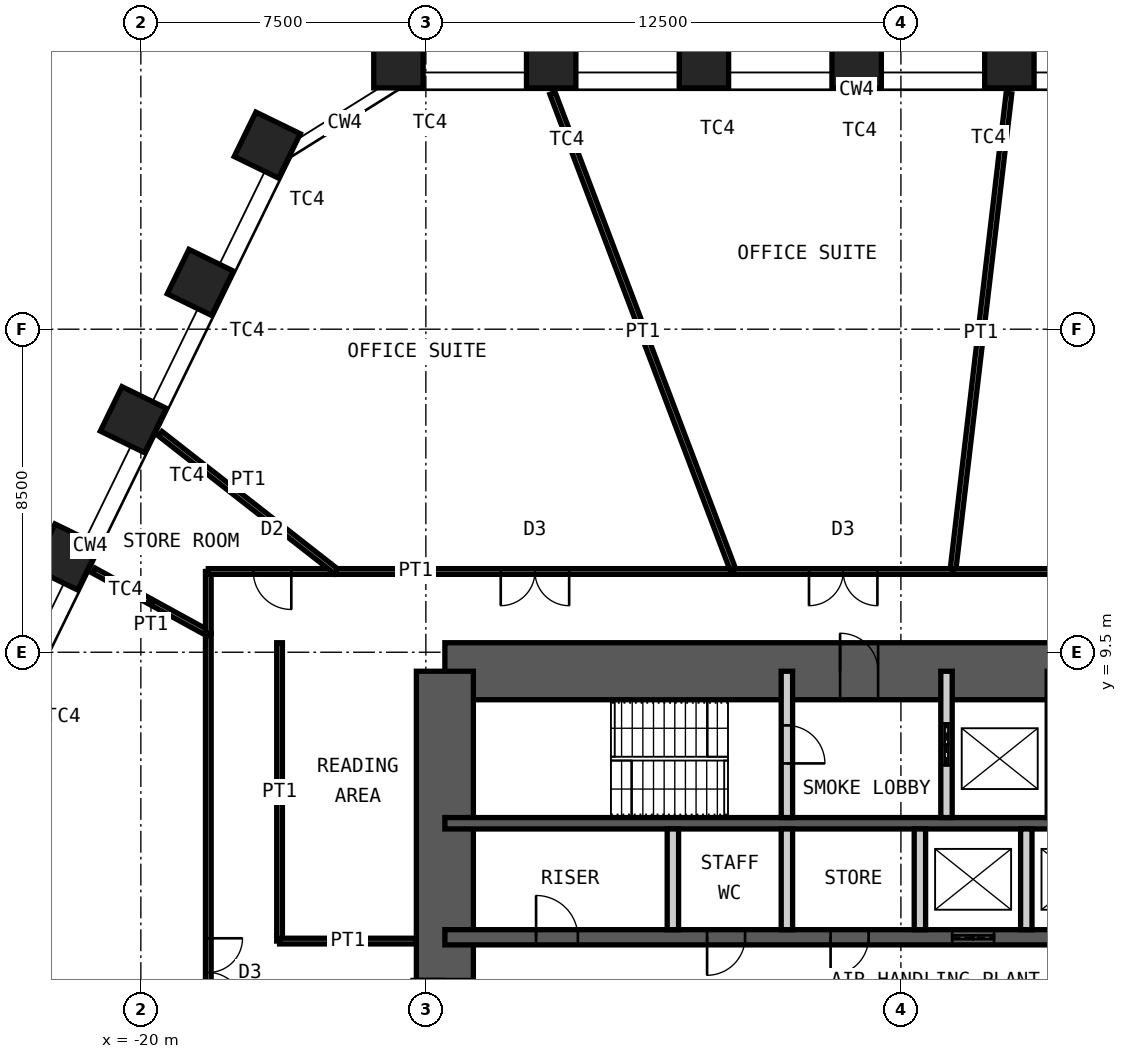
"""IFC4 building model, lengths in metres.
Left out: names, types, materials, properties, quantities, classifications, styles, units other than length and angle.
Written with IfcOpenShell. Run it as: python <this file> out.ifc"""

import sys

from ifc_helpers import new_model, si_unit, direction, frame, frame_2d, origin, origin_2d, place, context, subcontext, project, spatial, rectangle, hollow_rectangle, extrude, element, fill, save


model = new_model("IFC4")
c1 = context("Model", 3, precision=1e-05, world=origin(), true_north=direction((0.0, 1.0)))
c2 = subcontext(c1, "Body", "Model", "MODEL_VIEW")
j1 = project(units=[si_unit("LENGTHUNIT", "METRE"), si_unit("PLANEANGLEUNIT", "RADIAN")], contexts=[c1])
p1 = place(None, origin())
s1 = spatial("IfcSite", under=j1, at=p1, CompositionType="ELEMENT")
p2 = place(p1, origin())
s2 = spatial("IfcBuilding", under=s1, at=p2, CompositionType="ELEMENT")
p3 = place(p2, frame((0.0, 0.0, 161.8)))
s3 = spatial("IfcBuildingStorey", under=s2, at=p3, CompositionType="ELEMENT", Elevation=161.8)
for number, where, z_axis, x_axis in (
    (1, (-13.222, 25.0, 0.0), (0.0, 0.0, 1.0), (-1.0, 0.0, 0.0)),
    (2, (-9.203, 25.0, 0.0), (0.0, 0.0, 1.0), (-1.0, 0.0, 0.0)),
    (3, (-5.184, 25.0, 0.0), (0.0, 0.0, 1.0), (-1.0, 0.0, 0.0)),
    (4, (-1.165, 25.0, 0.0), (0.0, 0.0, 1.0), (-1.0, 0.0, 0.0)),
    (5, (2.854, 25.0, 0.0), (0.0, 0.0, 1.0), (-1.0, 0.0, 0.0)),
    (6, (-21.959, 12.006, 0.0), (0.0, 0.0, 1.0), (-0.438, -0.899, 0.0)),
    (7, (-20.198, 15.618, 0.0), (0.0, 0.0, 1.0), (-0.438, -0.899, 0.0)),
    (8, (-18.436, 19.23, 0.0), (0.0, 0.0, 1.0), (-0.438, -0.899, 0.0)),
    (9, (-16.674, 22.843, 0.0), (0.0, 0.0, 1.0), (-0.438, -0.899, 0.0)),
):
    element("IfcColumn", number, at=place(p3, frame(where, z_axis=z_axis, x_axis=x_axis)), inside=s3, PredefinedType="COLUMN", context=c2, shape_type="SweptSolid", body=[
        extrude(hollow_rectangle(XDim=1.3, YDim=1.3, WallThickness=0.1, at=origin_2d()), origin(), (0.0, 0.0, 1.0), 4.2),
    ])
p4 = place(p3, frame((-12.0, 9.0, 0.0), z_axis=(0.0, 0.0, 1.0), x_axis=(1.0, 0.0, 0.0)))
e10 = element("IfcWall", 10, at=p4, inside=s3, PredefinedType="SHEAR", context=c2, shape_type="SweptSolid", body=[
    extrude(rectangle(XDim=24.0, YDim=1.5, at=frame_2d((12.0, 0.0))), origin(), (0.0, 0.0, 1.0), 4.2),
])
p5 = place(p4, frame((10.4, 0.0, 0.0)))
e11 = element("IfcOpeningElement", 11, at=p5, cuts=e10, PredefinedType="OPENING", context=c2, shape_type="SweptSolid", body=[
    extrude(rectangle(XDim=1.0, YDim=2.1, at=frame_2d((0.5, 1.05))), frame((0.0, 0.76, 0.0), z_axis=(0.0, -1.0, 0.0), x_axis=(1.0, 0.0, 0.0)), (0.0, 0.0, 1.0), 1.52),
])
p6 = place(p4, frame((17.6, 0.0, 0.0)))
e12 = element("IfcOpeningElement", 12, at=p6, cuts=e10, PredefinedType="OPENING", context=c2, shape_type="SweptSolid", body=[
    extrude(rectangle(XDim=0.9, YDim=2.1, at=frame_2d((0.45, 1.05))), frame((0.0, 0.76, 0.0), z_axis=(0.0, -1.0, 0.0), x_axis=(1.0, 0.0, 0.0)), (0.0, 0.0, 1.0), 1.52),
])
p7 = place(p4, frame((21.9, 0.0, 0.0)))
e13 = element("IfcOpeningElement", 13, at=p7, cuts=e10, PredefinedType="OPENING", context=c2, shape_type="SweptSolid", body=[
    extrude(rectangle(XDim=0.9, YDim=2.1, at=frame_2d((0.45, 1.05))), frame((0.0, 0.76, 0.0), z_axis=(0.0, -1.0, 0.0), x_axis=(1.0, 0.0, 0.0)), (0.0, 0.0, 1.0), 1.52),
])
p8 = place(p3, frame((-12.0, -9.0, 0.0), z_axis=(0.0, 0.0, 1.0), x_axis=(0.0, 1.0, 0.0)))
e14 = element("IfcWall", 14, at=p8, inside=s3, PredefinedType="SHEAR", context=c2, shape_type="SweptSolid", body=[
    extrude(rectangle(XDim=18.0, YDim=1.5, at=frame_2d((9.0, 0.0))), origin(), (0.0, 0.0, 1.0), 4.2),
])
p9 = place(p8, frame((8.1, 0.0, 0.0)))
e15 = element("IfcOpeningElement", 15, at=p9, cuts=e14, PredefinedType="OPENING", context=c2, shape_type="SweptSolid", body=[
    extrude(rectangle(XDim=1.8, YDim=2.1, at=frame_2d((0.9, 1.05))), frame((0.0, 0.76, 0.0), z_axis=(0.0, -1.0, 0.0), x_axis=(1.0, 0.0, 0.0)), (0.0, 0.0, 1.0), 1.52),
])
p10 = place(p3, frame((-12.0, 5.0, 0.0), z_axis=(0.0, 0.0, 1.0), x_axis=(1.0, 0.0, 0.0)))
e16 = element("IfcWall", 16, at=p10, inside=s3, PredefinedType="SHEAR", context=c2, shape_type="SweptSolid", body=[
    extrude(rectangle(XDim=24.0, YDim=0.3, at=frame_2d((12.0, 0.0))), origin(), (0.0, 0.0, 1.0), 4.2),
])
p11 = place(p3, frame((-12.0, 2.0, 0.0), z_axis=(0.0, 0.0, 1.0), x_axis=(1.0, 0.0, 0.0)))
e17 = element("IfcWall", 17, at=p11, inside=s3, PredefinedType="SHEAR", context=c2, shape_type="SweptSolid", body=[
    extrude(rectangle(XDim=24.0, YDim=0.4, at=frame_2d((12.0, 0.0))), origin(), (0.0, 0.0, 1.0), 4.2),
])
p12 = place(p11, frame((2.4, 0.0, 0.0)))
e18 = element("IfcOpeningElement", 18, at=p12, cuts=e17, PredefinedType="OPENING", context=c2, shape_type="SweptSolid", body=[
    extrude(rectangle(XDim=1.1, YDim=2.1, at=frame_2d((0.55, 1.05))), frame((0.0, 0.21, 0.0), z_axis=(0.0, -1.0, 0.0), x_axis=(1.0, 0.0, 0.0)), (0.0, 0.0, 1.0), 0.42),
])
p13 = place(p11, frame((22.0, 0.0, 0.0)))
e19 = element("IfcOpeningElement", 19, at=p13, cuts=e17, PredefinedType="OPENING", context=c2, shape_type="SweptSolid", body=[
    extrude(rectangle(XDim=1.1, YDim=2.1, at=frame_2d((0.55, 1.05))), frame((0.0, 0.21, 0.0), z_axis=(0.0, -1.0, 0.0), x_axis=(1.0, 0.0, 0.0)), (0.0, 0.0, 1.0), 0.42),
])
p14 = place(p11, frame((10.15, 0.0, 0.0)))
e20 = element("IfcOpeningElement", 20, at=p14, cuts=e17, PredefinedType="OPENING", context=c2, shape_type="SweptSolid", body=[
    extrude(rectangle(XDim=1.0, YDim=2.1, at=frame_2d((0.5, 1.05))), frame((0.0, 0.21, 0.0), z_axis=(0.0, -1.0, 0.0), x_axis=(1.0, 0.0, 0.0)), (0.0, 0.0, 1.0), 0.42),
])
p15 = place(p11, frame((6.9, 0.0, 0.0)))
e21 = element("IfcOpeningElement", 21, at=p15, cuts=e17, PredefinedType="OPENING", context=c2, shape_type="SweptSolid", body=[
    extrude(rectangle(XDim=1.0, YDim=2.1, at=frame_2d((0.5, 1.05))), frame((0.0, 0.21, 0.0), z_axis=(0.0, -1.0, 0.0), x_axis=(1.0, 0.0, 0.0)), (0.0, 0.0, 1.0), 0.42),
])
p16 = place(p11, frame((13.35, 0.0, 0.0)))
e22 = element("IfcOpeningElement", 22, at=p16, cuts=e17, PredefinedType="OPENING", context=c2, shape_type="SweptSolid", body=[
    extrude(rectangle(XDim=1.1, YDim=2.4, at=frame_2d((0.55, 1.2))), frame((0.0, 0.21, 0.0), z_axis=(0.0, -1.0, 0.0), x_axis=(1.0, 0.0, 0.0)), (0.0, 0.0, 1.0), 0.42),
])
p17 = place(p11, frame((16.15, 0.0, 0.0)))
e23 = element("IfcOpeningElement", 23, at=p17, cuts=e17, PredefinedType="OPENING", context=c2, shape_type="SweptSolid", body=[
    extrude(rectangle(XDim=1.1, YDim=2.4, at=frame_2d((0.55, 1.2))), frame((0.0, 0.21, 0.0), z_axis=(0.0, -1.0, 0.0), x_axis=(1.0, 0.0, 0.0)), (0.0, 0.0, 1.0), 0.42),
])
p18 = place(p11, frame((18.95, 0.0, 0.0)))
e24 = element("IfcOpeningElement", 24, at=p18, cuts=e17, PredefinedType="OPENING", context=c2, shape_type="SweptSolid", body=[
    extrude(rectangle(XDim=1.1, YDim=2.4, at=frame_2d((0.55, 1.2))), frame((0.0, 0.21, 0.0), z_axis=(0.0, -1.0, 0.0), x_axis=(1.0, 0.0, 0.0)), (0.0, 0.0, 1.0), 0.42),
])
p19 = place(p3, frame((-3.0, 5.15, 0.0), z_axis=(0.0, 0.0, 1.0), x_axis=(0.0, 1.0, 0.0)))
e25 = element("IfcWall", 25, at=p19, inside=s3, PredefinedType="PARTITIONING", context=c2, shape_type="SweptSolid", body=[
    extrude(rectangle(XDim=3.85, YDim=0.3, at=frame_2d((1.925, 0.0))), origin(), (0.0, 0.0, 1.0), 3.98),
])
p20 = place(p19, frame((1.425, 0.0, 0.0)))
e26 = element("IfcOpeningElement", 26, at=p20, cuts=e25, PredefinedType="OPENING", context=c2, shape_type="SweptSolid", body=[
    extrude(rectangle(XDim=1.0, YDim=2.1, at=frame_2d((0.5, 1.05))), frame((0.0, 0.16, 0.0), z_axis=(0.0, -1.0, 0.0), x_axis=(1.0, 0.0, 0.0)), (0.0, 0.0, 1.0), 0.32),
])
p21 = place(p3, frame((1.2, 5.15, 0.0), z_axis=(0.0, 0.0, 1.0), x_axis=(0.0, 1.0, 0.0)))
e27 = element("IfcWall", 27, at=p21, inside=s3, PredefinedType="PARTITIONING", context=c2, shape_type="SweptSolid", body=[
    extrude(rectangle(XDim=3.85, YDim=0.3, at=frame_2d((1.925, 0.0))), origin(), (0.0, 0.0, 1.0), 3.98),
])
p22 = place(p21, frame((1.375, 0.0, 0.0)))
e28 = element("IfcOpeningElement", 28, at=p22, cuts=e27, PredefinedType="OPENING", context=c2, shape_type="SweptSolid", body=[
    extrude(rectangle(XDim=1.1, YDim=2.4, at=frame_2d((0.55, 1.2))), frame((0.0, 0.16, 0.0), z_axis=(0.0, -1.0, 0.0), x_axis=(1.0, 0.0, 0.0)), (0.0, 0.0, 1.0), 0.32),
])
p23 = place(p3, frame((4.0, 5.15, 0.0), z_axis=(0.0, 0.0, 1.0), x_axis=(0.0, 1.0, 0.0)))
e29 = element("IfcWall", 29, at=p23, inside=s3, PredefinedType="PARTITIONING", context=c2, shape_type="SweptSolid", body=[
    extrude(rectangle(XDim=3.85, YDim=0.3, at=frame_2d((1.925, 0.0))), origin(), (0.0, 0.0, 1.0), 3.98),
])
for number, where, z_axis, x_axis in (
    (30, (-6.0, 2.2, 0.0), (0.0, 0.0, 1.0), (0.0, 1.0, 0.0)),
    (31, (-3.0, 2.2, 0.0), (0.0, 0.0, 1.0), (0.0, 1.0, 0.0)),
    (32, (0.5, 2.2, 0.0), (0.0, 0.0, 1.0), (0.0, 1.0, 0.0)),
    (33, (3.3, 2.2, 0.0), (0.0, 0.0, 1.0), (0.0, 1.0, 0.0)),
):
    element("IfcWall", number, at=place(p3, frame(where, z_axis=z_axis, x_axis=x_axis)), inside=s3, PredefinedType="PARTITIONING", context=c2, shape_type="SweptSolid", body=[
        extrude(rectangle(XDim=2.65, YDim=0.3, at=frame_2d((1.325, 0.0))), origin(), (0.0, 0.0, 1.0), 3.98),
    ])
p24 = place(p3, frame((2.843, 24.201, 0.0), z_axis=(0.0, 0.0, 1.0), x_axis=(-0.116670084723, -0.993170726175, 0.0)))
e34 = element("IfcWall", 34, at=p24, inside=s3, PredefinedType="PARTITIONING", context=c2, shape_type="SweptSolid", body=[
    extrude(rectangle(XDim=12.662, YDim=0.15, at=frame_2d((6.331, 0.0))), origin(), (0.0, 0.0, 1.0), 3.28),
])
p25 = place(p3, frame((1.366, 11.625, 0.0), z_axis=(0.0, 0.0, 1.0), x_axis=(1.0, 0.0, 0.0)))
e35 = element("IfcWall", 35, at=p25, inside=s3, PredefinedType="PARTITIONING", context=c2, shape_type="SweptSolid", body=[
    extrude(rectangle(XDim=8.46, YDim=0.15, at=frame_2d((4.23, 0.0))), origin(), (0.0, 0.0, 1.0), 4.03),
])
p26 = place(p25, frame((3.33, 0.0, 0.0)))
e36 = element("IfcOpeningElement", 36, at=p26, cuts=e35, PredefinedType="OPENING", context=c2, shape_type="SweptSolid", body=[
    extrude(rectangle(XDim=1.8, YDim=2.4, at=frame_2d((0.9, 1.2))), frame((0.0, 0.085, 0.0), z_axis=(0.0, -1.0, 0.0), x_axis=(1.0, 0.0, 0.0)), (0.0, 0.0, 1.0), 0.17),
])
p27 = place(p3, frame((-18.225, -7.849, 0.0), z_axis=(0.0, 0.0, 1.0), x_axis=(0.0, 1.0, 0.0)))
e37 = element("IfcWall", 37, at=p27, inside=s3, PredefinedType="PARTITIONING", context=c2, shape_type="SweptSolid", body=[
    extrude(rectangle(XDim=17.845, YDim=0.15, at=frame_2d((8.922, 0.0))), origin(), (0.0, 0.0, 1.0), 4.03),
])
p28 = place(p27, frame((8.022, 0.0, 0.0)))
e38 = element("IfcOpeningElement", 38, at=p28, cuts=e37, PredefinedType="OPENING", context=c2, shape_type="SweptSolid", body=[
    extrude(rectangle(XDim=1.8, YDim=2.4, at=frame_2d((0.9, 1.2))), frame((0.0, 0.085, 0.0), z_axis=(0.0, -1.0, 0.0), x_axis=(1.0, 0.0, 0.0)), (0.0, 0.0, 1.0), 0.17),
])
p29 = place(p3, frame((-21.242, 11.651, 0.0), z_axis=(0.0, 0.0, 1.0), x_axis=(0.876768023831, -0.480913539409, 0.0)))
e39 = element("IfcWall", 39, at=p29, inside=s3, PredefinedType="PARTITIONING", context=c2, shape_type="SweptSolid", body=[
    extrude(rectangle(XDim=3.441, YDim=0.15, at=frame_2d((1.721, 0.0))), origin(), (0.0, 0.0, 1.0), 3.28),
])
p30 = place(p3, frame((-18.225, 9.996, 0.0), z_axis=(0.0, 0.0, 1.0), x_axis=(0.0, 1.0, 0.0)))
e40 = element("IfcWall", 40, at=p30, inside=s3, PredefinedType="PARTITIONING", context=c2, shape_type="SweptSolid", body=[
    extrude(rectangle(XDim=1.629, YDim=0.15, at=frame_2d((0.814, 0.0))), origin(), (0.0, 0.0, 1.0), 4.03),
])
p31 = place(p3, frame((-18.225, 11.625, 0.0), z_axis=(0.0, 0.0, 1.0), x_axis=(1.0, 0.0, 0.0)))
e41 = element("IfcWall", 41, at=p31, inside=s3, PredefinedType="PARTITIONING", context=c2, shape_type="SweptSolid", body=[
    extrude(rectangle(XDim=3.368, YDim=0.15, at=frame_2d((1.684, 0.0))), origin(), (0.0, 0.0, 1.0), 4.03),
])
p32 = place(p31, frame((1.184, 0.0, 0.0)))
e42 = element("IfcOpeningElement", 42, at=p32, cuts=e41, PredefinedType="OPENING", context=c2, shape_type="SweptSolid", body=[
    extrude(rectangle(XDim=1.0, YDim=2.4, at=frame_2d((0.5, 1.2))), frame((0.0, 0.085, 0.0), z_axis=(0.0, -1.0, 0.0), x_axis=(1.0, 0.0, 0.0)), (0.0, 0.0, 1.0), 0.17),
])
p33 = place(p3, frame((-19.49, 15.25, 0.0), z_axis=(0.0, 0.0, 1.0), x_axis=(0.787549668605, -0.616251182133, 0.0)))
e43 = element("IfcWall", 43, at=p33, inside=s3, PredefinedType="PARTITIONING", context=c2, shape_type="SweptSolid", body=[
    extrude(rectangle(XDim=5.882, YDim=0.15, at=frame_2d((2.941, 0.0))), origin(), (0.0, 0.0, 1.0), 3.28),
])
p34 = place(p3, frame((-14.857, 11.625, 0.0), z_axis=(0.0, 0.0, 1.0), x_axis=(1.0, 0.0, 0.0)))
e44 = element("IfcWall", 44, at=p34, inside=s3, PredefinedType="PARTITIONING", context=c2, shape_type="SweptSolid", body=[
    extrude(rectangle(XDim=10.455, YDim=0.15, at=frame_2d((5.227, 0.0))), origin(), (0.0, 0.0, 1.0), 4.03),
])
p35 = place(p34, frame((4.327, 0.0, 0.0)))
e45 = element("IfcOpeningElement", 45, at=p35, cuts=e44, PredefinedType="OPENING", context=c2, shape_type="SweptSolid", body=[
    extrude(rectangle(XDim=1.8, YDim=2.4, at=frame_2d((0.9, 1.2))), frame((0.0, 0.085, 0.0), z_axis=(0.0, -1.0, 0.0), x_axis=(1.0, 0.0, 0.0)), (0.0, 0.0, 1.0), 0.17),
])
p36 = place(p3, frame((-9.167, 24.207, 0.0), z_axis=(0.0, 0.0, 1.0), x_axis=(0.354156368181, -0.935186220427, 0.0)))
e46 = element("IfcWall", 46, at=p36, inside=s3, PredefinedType="PARTITIONING", context=c2, shape_type="SweptSolid", body=[
    extrude(rectangle(XDim=13.454, YDim=0.15, at=frame_2d((6.727, 0.0))), origin(), (0.0, 0.0, 1.0), 3.28),
])
p37 = place(p3, frame((-4.403, 11.625, 0.0), z_axis=(0.0, 0.0, 1.0), x_axis=(1.0, 0.0, 0.0)))
e47 = element("IfcWall", 47, at=p37, inside=s3, PredefinedType="PARTITIONING", context=c2, shape_type="SweptSolid", body=[
    extrude(rectangle(XDim=5.768, YDim=0.15, at=frame_2d((2.884, 0.0))), origin(), (0.0, 0.0, 1.0), 4.03),
])
p38 = place(p37, frame((1.984, 0.0, 0.0)))
e48 = element("IfcOpeningElement", 48, at=p38, cuts=e47, PredefinedType="OPENING", context=c2, shape_type="SweptSolid", body=[
    extrude(rectangle(XDim=1.8, YDim=2.4, at=frame_2d((0.9, 1.2))), frame((0.0, 0.085, 0.0), z_axis=(0.0, -1.0, 0.0), x_axis=(1.0, 0.0, 0.0)), (0.0, 0.0, 1.0), 0.17),
])
p39 = place(p3, frame((-16.35, 1.9, 0.0), z_axis=(0.0, 0.0, 1.0), x_axis=(0.0, 1.0, 0.0)))
e49 = element("IfcWall", 49, at=p39, inside=s3, PredefinedType="PARTITIONING", context=c2, shape_type="SweptSolid", body=[
    extrude(rectangle(XDim=7.85, YDim=0.15, at=frame_2d((3.925, 0.0))), origin(), (0.0, 0.0, 1.0), 4.03),
])
p40 = place(p3, frame((-12.75, 1.9, 0.0), z_axis=(0.0, 0.0, 1.0), x_axis=(-1.0, 0.0, 0.0)))
e50 = element("IfcWall", 50, at=p40, inside=s3, PredefinedType="PARTITIONING", context=c2, shape_type="SweptSolid", body=[
    extrude(rectangle(XDim=3.6, YDim=0.15, at=frame_2d((1.8, 0.0))), origin(), (0.0, 0.0, 1.0), 3.33),
])
p41 = place(p5, origin())
e51 = element("IfcDoor", 51, at=p41, inside=s3, OperationType="SINGLE_SWING_RIGHT", PredefinedType="DOOR", context=c2, shape_type="SweptSolid", body=[
    extrude(rectangle(XDim=1.0, YDim=2.1, at=frame_2d((0.5, 1.05))), frame((0.0, 0.025, 0.0), z_axis=(0.0, -1.0, 0.0), x_axis=(1.0, 0.0, 0.0)), (0.0, 0.0, 1.0), 0.05),
])
fill(e11, e51)
p42 = place(p20, origin())
e52 = element("IfcDoor", 52, at=p42, inside=s3, OperationType="SINGLE_SWING_LEFT", PredefinedType="DOOR", context=c2, shape_type="SweptSolid", body=[
    extrude(rectangle(XDim=1.0, YDim=2.1, at=frame_2d((0.5, 1.05))), frame((0.0, 0.025, 0.0), z_axis=(0.0, -1.0, 0.0), x_axis=(1.0, 0.0, 0.0)), (0.0, 0.0, 1.0), 0.05),
])
fill(e26, e52)
p43 = place(p12, origin())
e53 = element("IfcDoor", 53, at=p43, inside=s3, OperationType="SINGLE_SWING_RIGHT", PredefinedType="DOOR", context=c2, shape_type="SweptSolid", body=[
    extrude(rectangle(XDim=1.1, YDim=2.1, at=frame_2d((0.55, 1.05))), frame((0.0, 0.025, 0.0), z_axis=(0.0, -1.0, 0.0), x_axis=(1.0, 0.0, 0.0)), (0.0, 0.0, 1.0), 0.05),
])
fill(e18, e53)
p44 = place(p14, origin())
e54 = element("IfcDoor", 54, at=p44, inside=s3, OperationType="SINGLE_SWING_LEFT", PredefinedType="DOOR", context=c2, shape_type="SweptSolid", body=[
    extrude(rectangle(XDim=1.0, YDim=2.1, at=frame_2d((0.5, 1.05))), frame((0.0, 0.025, 0.0), z_axis=(0.0, -1.0, 0.0), x_axis=(1.0, 0.0, 0.0)), (0.0, 0.0, 1.0), 0.05),
])
fill(e20, e54)
p45 = place(p9, origin())
e55 = element("IfcDoor", 55, at=p45, inside=s3, OperationType="DOUBLE_DOOR_DOUBLE_SWING", PredefinedType="DOOR", context=c2, shape_type="SweptSolid", body=[
    extrude(rectangle(XDim=1.8, YDim=2.1, at=frame_2d((0.9, 1.05))), frame((0.0, 0.025, 0.0), z_axis=(0.0, -1.0, 0.0), x_axis=(1.0, 0.0, 0.0)), (0.0, 0.0, 1.0), 0.05),
])
fill(e15, e55)
p46 = place(p22, origin())
e56 = element("IfcDoor", 56, at=p46, inside=s3, OperationType="DOUBLE_DOOR_SLIDING", PredefinedType="DOOR", context=c2, shape_type="SweptSolid", body=[
    extrude(rectangle(XDim=1.1, YDim=2.4, at=frame_2d((0.55, 1.2))), frame((0.0, 0.025, 0.0), z_axis=(0.0, -1.0, 0.0), x_axis=(1.0, 0.0, 0.0)), (0.0, 0.0, 1.0), 0.05),
])
fill(e28, e56)
p47 = place(p15, origin())
e57 = element("IfcDoor", 57, at=p47, inside=s3, OperationType="SINGLE_SWING_LEFT", PredefinedType="DOOR", context=c2, shape_type="SweptSolid", body=[
    extrude(rectangle(XDim=1.0, YDim=2.1, at=frame_2d((0.5, 1.05))), frame((0.0, 0.025, 0.0), z_axis=(0.0, -1.0, 0.0), x_axis=(1.0, 0.0, 0.0)), (0.0, 0.0, 1.0), 0.05),
])
fill(e21, e57)
p48 = place(p16, origin())
e58 = element("IfcDoor", 58, at=p48, inside=s3, OperationType="DOUBLE_DOOR_SLIDING", PredefinedType="DOOR", context=c2, shape_type="SweptSolid", body=[
    extrude(rectangle(XDim=1.1, YDim=2.4, at=frame_2d((0.55, 1.2))), frame((0.0, 0.025, 0.0), z_axis=(0.0, -1.0, 0.0), x_axis=(1.0, 0.0, 0.0)), (0.0, 0.0, 1.0), 0.05),
])
fill(e22, e58)
p49 = place(p28, origin())
e59 = element("IfcDoor", 59, at=p49, inside=s3, OperationType="DOUBLE_DOOR_DOUBLE_SWING", PredefinedType="DOOR", context=c2, shape_type="SweptSolid", body=[
    extrude(rectangle(XDim=1.8, YDim=2.4, at=frame_2d((0.9, 1.2))), frame((0.0, 0.025, 0.0), z_axis=(0.0, -1.0, 0.0), x_axis=(1.0, 0.0, 0.0)), (0.0, 0.0, 1.0), 0.05),
])
fill(e38, e59)
p50 = place(p32, origin())
e60 = element("IfcDoor", 60, at=p50, inside=s3, OperationType="SINGLE_SWING_RIGHT", PredefinedType="DOOR", context=c2, shape_type="SweptSolid", body=[
    extrude(rectangle(XDim=1.0, YDim=2.4, at=frame_2d((0.5, 1.2))), frame((0.0, 0.025, 0.0), z_axis=(0.0, -1.0, 0.0), x_axis=(1.0, 0.0, 0.0)), (0.0, 0.0, 1.0), 0.05),
])
fill(e42, e60)
p51 = place(p35, origin())
e61 = element("IfcDoor", 61, at=p51, inside=s3, OperationType="DOUBLE_DOOR_DOUBLE_SWING", PredefinedType="DOOR", context=c2, shape_type="SweptSolid", body=[
    extrude(rectangle(XDim=1.8, YDim=2.4, at=frame_2d((0.9, 1.2))), frame((0.0, 0.025, 0.0), z_axis=(0.0, -1.0, 0.0), x_axis=(1.0, 0.0, 0.0)), (0.0, 0.0, 1.0), 0.05),
])
fill(e45, e61)
p52 = place(p38, origin())
e62 = element("IfcDoor", 62, at=p52, inside=s3, OperationType="DOUBLE_DOOR_DOUBLE_SWING", PredefinedType="DOOR", context=c2, shape_type="SweptSolid", body=[
    extrude(rectangle(XDim=1.8, YDim=2.4, at=frame_2d((0.9, 1.2))), frame((0.0, 0.025, 0.0), z_axis=(0.0, -1.0, 0.0), x_axis=(1.0, 0.0, 0.0)), (0.0, 0.0, 1.0), 0.05),
])
fill(e48, e62)
save(model, sys.argv[1])
